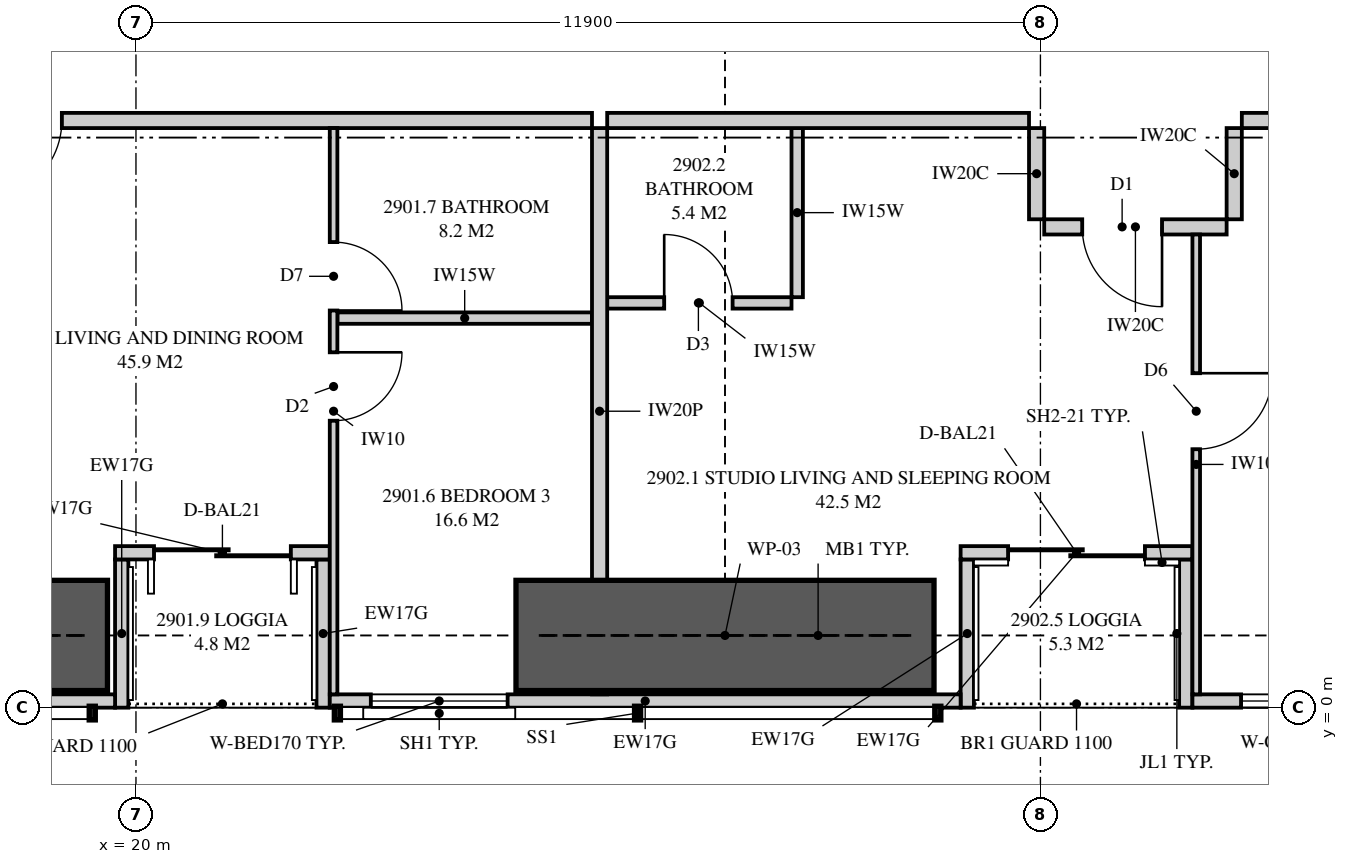
"""IFC4 building model, lengths in metres.
Left out: names, types, materials, properties, quantities, classifications, styles, units other than length and angle.
Written with IfcOpenShell. Run it as: python <this file> out.ifc"""

import sys

from ifc_helpers import new_model, si_unit, direction, frame, frame_2d, origin, place, context, subcontext, project, spatial, polyline, rectangle, outline, extrude, element, fill, save


model = new_model("IFC4")
c1 = context("Model", 3, precision=1e-05, world=origin(), true_north=direction((0.0, 1.0)))
c2 = subcontext(c1, "Body", "Model", "MODEL_VIEW")
j1 = project(units=[si_unit("LENGTHUNIT", "METRE"), si_unit("PLANEANGLEUNIT", "RADIAN")], contexts=[c1])
p1 = place(None, origin())
s1 = spatial("IfcSite", under=j1, at=p1, CompositionType="ELEMENT")
p2 = place(p1, origin())
s2 = spatial("IfcBuilding", under=s1, at=p2, CompositionType="ELEMENT")
p3 = place(p2, frame((0.0, 0.0, 108.2)))
s3 = spatial("IfcBuildingStorey", under=s2, at=p3, CompositionType="ELEMENT", Elevation=108.2)
p4 = place(p3, frame((9.051, 0.087, 0.0), z_axis=(0.0, 0.0, 1.0), x_axis=(1.0, 0.0, 0.0)))
e1 = element("IfcWall", 1, at=p4, inside=s3, PredefinedType="SOLIDWALL", context=c2, shape_type="SweptSolid", body=[
    extrude(outline(polyline([(0.0, 0.0), (10.674, 0.0), (10.674, 2.15), (7.824, 2.15), (7.824, 3.11), (7.666, 3.11), (7.666, 2.15), (7.62, 2.15), (7.62, 3.11), (0.0, 3.11), (0.0, 0.0)])), frame((0.0, 0.087, 0.0), z_axis=(0.0, -1.0, 0.0), x_axis=(1.0, 0.0, 0.0)), (0.0, 0.0, 1.0), 0.175),
])
p5 = place(p4, frame((2.349, 0.0, 0.4)))
e2 = element("IfcOpeningElement", 2, at=p5, cuts=e1, PredefinedType="OPENING", context=c2, shape_type="SweptSolid", body=[
    extrude(rectangle(XDim=1.8, YDim=1.7, at=frame_2d((0.9, 0.85))), frame((0.0, 0.097, 0.0), z_axis=(0.0, -1.0, 0.0), x_axis=(1.0, 0.0, 0.0)), (0.0, 0.0, 1.0), 0.195),
])
p6 = place(p3, frame((22.55, 0.087, 0.0), z_axis=(0.0, 0.0, 1.0), x_axis=(1.0, 0.0, 0.0)))
e3 = element("IfcWall", 3, at=p6, inside=s3, PredefinedType="SOLIDWALL", context=c2, shape_type="SweptSolid", body=[
    extrude(rectangle(XDim=8.3, YDim=0.175, at=frame_2d((4.15, 0.0))), origin(), (0.0, 0.0, 1.0), 2.15),
])
p7 = place(p6, frame((0.54, 0.0, 0.4)))
e4 = element("IfcOpeningElement", 4, at=p7, cuts=e3, PredefinedType="OPENING", context=c2, shape_type="SweptSolid", body=[
    extrude(rectangle(XDim=1.8, YDim=1.7, at=frame_2d((0.9, 0.85))), frame((0.0, 0.097, 0.0), z_axis=(0.0, -1.0, 0.0), x_axis=(1.0, 0.0, 0.0)), (0.0, 0.0, 1.0), 0.195),
])
p8 = place(p3, frame((33.9, 0.087, 0.0), z_axis=(0.0, 0.0, 1.0), x_axis=(1.0, 0.0, 0.0)))
e5 = element("IfcWall", 5, at=p8, inside=s3, PredefinedType="SOLIDWALL", context=c2, shape_type="SweptSolid", body=[
    extrude(outline(polyline([(0.0, 0.0), (7.75, 0.0), (7.75, 3.11), (4.928, 3.11), (4.928, 2.15), (4.883, 2.15), (4.883, 3.11), (4.725, 3.11), (4.725, 2.15), (0.0, 2.15), (0.0, 0.0)])), frame((0.0, 0.087, 0.0), z_axis=(0.0, -1.0, 0.0), x_axis=(1.0, 0.0, 0.0)), (0.0, 0.0, 1.0), 0.175),
])
p9 = place(p8, frame((0.64, 0.0, 0.4)))
e6 = element("IfcOpeningElement", 6, at=p9, cuts=e5, PredefinedType="OPENING", context=c2, shape_type="SweptSolid", body=[
    extrude(rectangle(XDim=1.2, YDim=1.7, at=frame_2d((0.6, 0.85))), frame((0.0, 0.097, 0.0), z_axis=(0.0, -1.0, 0.0), x_axis=(1.0, 0.0, 0.0)), (0.0, 0.0, 1.0), 0.195),
])
p10 = place(p3, frame((19.725, 2.038, 0.0), z_axis=(0.0, 0.0, 1.0), x_axis=(1.0, 0.0, 0.0)))
e7 = element("IfcWall", 7, at=p10, inside=s3, PredefinedType="SOLIDWALL", context=c2, shape_type="SweptSolid", body=[
    extrude(rectangle(XDim=2.825, YDim=0.175, at=frame_2d((1.413, 0.0))), origin(), (0.0, 0.0, 1.0), 3.11),
])
p11 = place(p10, frame((0.512, 0.0, 0.0)))
e8 = element("IfcOpeningElement", 8, at=p11, cuts=e7, PredefinedType="OPENING", context=c2, shape_type="SweptSolid", body=[
    extrude(rectangle(XDim=1.8, YDim=2.1, at=frame_2d((0.9, 1.05))), frame((0.0, 0.097, 0.0), z_axis=(0.0, -1.0, 0.0), x_axis=(1.0, 0.0, 0.0)), (0.0, 0.0, 1.0), 0.195),
])
for number, where, z_axis, x_axis in (
    (9, (19.812, 0.0, 0.0), (0.0, 0.0, 1.0), (0.0, 1.0, 0.0)),
    (10, (22.462, 0.0, 0.0), (0.0, 0.0, 1.0), (0.0, 1.0, 0.0)),
):
    element("IfcWall", number, at=place(p3, frame(where, z_axis=z_axis, x_axis=x_axis)), inside=s3, PredefinedType="SOLIDWALL", context=c2, shape_type="SweptSolid", body=[
        extrude(outline(polyline([(0.0, 0.0), (1.95, 0.0), (1.95, 3.11), (1.75, 3.11), (1.75, 2.15), (0.15, 2.15), (0.15, 3.11), (0.0, 3.11), (0.0, 0.0)])), frame((0.0, 0.087, 0.0), z_axis=(0.0, -1.0, 0.0), x_axis=(1.0, 0.0, 0.0)), (0.0, 0.0, 1.0), 0.175),
    ])
p12 = place(p3, frame((30.85, 2.038, 0.0), z_axis=(0.0, 0.0, 1.0), x_axis=(1.0, 0.0, 0.0)))
e11 = element("IfcWall", 11, at=p12, inside=s3, PredefinedType="SOLIDWALL", context=c2, shape_type="SweptSolid", body=[
    extrude(rectangle(XDim=3.05, YDim=0.175, at=frame_2d((1.525, 0.0))), origin(), (0.0, 0.0, 1.0), 3.11),
])
p13 = place(p12, frame((0.625, 0.0, 0.0)))
e12 = element("IfcOpeningElement", 12, at=p13, cuts=e11, PredefinedType="OPENING", context=c2, shape_type="SweptSolid", body=[
    extrude(rectangle(XDim=1.8, YDim=2.1, at=frame_2d((0.9, 1.05))), frame((0.0, 0.097, 0.0), z_axis=(0.0, -1.0, 0.0), x_axis=(1.0, 0.0, 0.0)), (0.0, 0.0, 1.0), 0.195),
])
for number, where, z_axis, x_axis in (
    (13, (30.938, 0.0, 0.0), (0.0, 0.0, 1.0), (0.0, 1.0, 0.0)),
    (14, (33.812, 0.0, 0.0), (0.0, 0.0, 1.0), (0.0, 1.0, 0.0)),
):
    element("IfcWall", number, at=place(p3, frame(where, z_axis=z_axis, x_axis=x_axis)), inside=s3, PredefinedType="SOLIDWALL", context=c2, shape_type="SweptSolid", body=[
        extrude(outline(polyline([(0.0, 0.0), (1.95, 0.0), (1.95, 3.11), (1.75, 3.11), (1.75, 2.15), (0.15, 2.15), (0.15, 3.11), (0.0, 3.11), (0.0, 0.0)])), frame((0.0, 0.087, 0.0), z_axis=(0.0, -1.0, 0.0), x_axis=(1.0, 0.0, 0.0)), (0.0, 0.0, 1.0), 0.175),
    ])
p14 = place(p3, frame((26.1, 0.175, 0.0), z_axis=(0.0, 0.0, 1.0), x_axis=(0.0, 1.0, 0.0)))
e15 = element("IfcWall", 15, at=p14, inside=s3, PredefinedType="PARTITIONING", context=c2, shape_type="SweptSolid", body=[
    extrude(outline(polyline([(0.529, 2.15), (0.0, 2.15), (0.0, 0.0), (0.529, 0.0), (0.529, 0.376), (1.021, 0.376), (1.021, 0.0), (7.45, 0.0), (7.45, 3.11), (1.685, 3.11), (1.685, 2.15), (1.021, 2.15), (1.021, 1.774), (0.529, 1.774), (0.529, 2.15)])), frame((0.0, 0.1, 0.0), z_axis=(0.0, -1.0, 0.0), x_axis=(1.0, 0.0, 0.0)), (0.0, 0.0, 1.0), 0.2),
])
p15 = place(p3, frame((17.775, 7.725, 0.0), z_axis=(0.0, 0.0, 1.0), x_axis=(1.0, 0.0, 0.0)))
e16 = element("IfcWall", 16, at=p15, inside=s3, PredefinedType="PARTITIONING", context=c2, shape_type="SweptSolid", body=[
    extrude(rectangle(XDim=8.225, YDim=0.2, at=frame_2d((4.113, 0.0))), origin(), (0.0, 0.0, 1.0), 3.11),
])
p16 = place(p15, frame((0.2, 0.0, 0.0)))
e17 = element("IfcOpeningElement", 17, at=p16, cuts=e16, PredefinedType="OPENING", context=c2, shape_type="SweptSolid", body=[
    extrude(rectangle(XDim=1.05, YDim=2.2, at=frame_2d((0.525, 1.1))), frame((0.0, 0.11, 0.0), z_axis=(0.0, -1.0, 0.0), x_axis=(1.0, 0.0, 0.0)), (0.0, 0.0, 1.0), 0.22),
])
p17 = place(p3, frame((22.6, 0.175, 0.0), z_axis=(0.0, 0.0, 1.0), x_axis=(0.0, 1.0, 0.0)))
e18 = element("IfcWall", 18, at=p17, inside=s3, PredefinedType="PARTITIONING", context=c2, shape_type="SweptSolid", body=[
    extrude(outline(polyline([(0.0, 0.0), (7.45, 0.0), (7.45, 3.11), (1.635, 3.11), (1.635, 2.15), (0.0, 2.15), (0.0, 3.11), (0.0, 0.0)])), frame((0.0, 0.05, 0.0), z_axis=(0.0, -1.0, 0.0), x_axis=(1.0, 0.0, 0.0)), (0.0, 0.0, 1.0), 0.1),
])
p18 = place(p17, frame((3.6, 0.0, 0.0)))
e19 = element("IfcOpeningElement", 19, at=p18, cuts=e18, PredefinedType="OPENING", context=c2, shape_type="SweptSolid", body=[
    extrude(rectangle(XDim=0.9, YDim=2.1, at=frame_2d((0.45, 1.05))), frame((0.0, 0.06, 0.0), z_axis=(0.0, -1.0, 0.0), x_axis=(1.0, 0.0, 0.0)), (0.0, 0.0, 1.0), 0.12),
])
p19 = place(p17, frame((5.05, 0.0, 0.0)))
e20 = element("IfcOpeningElement", 20, at=p19, cuts=e18, PredefinedType="OPENING", context=c2, shape_type="SweptSolid", body=[
    extrude(rectangle(XDim=0.9, YDim=2.1, at=frame_2d((0.45, 1.05))), frame((0.0, 0.06, 0.0), z_axis=(0.0, -1.0, 0.0), x_axis=(1.0, 0.0, 0.0)), (0.0, 0.0, 1.0), 0.12),
])
p20 = place(p3, frame((22.65, 5.125, 0.0), z_axis=(0.0, 0.0, 1.0), x_axis=(1.0, 0.0, 0.0)))
e21 = element("IfcWall", 21, at=p20, inside=s3, PredefinedType="PLUMBINGWALL", context=c2, shape_type="SweptSolid", body=[
    extrude(rectangle(XDim=3.35, YDim=0.15, at=frame_2d((1.675, 0.0))), origin(), (0.0, 0.0, 1.0), 3.11),
])
p21 = place(p3, frame((26.2, 7.725, 0.0), z_axis=(0.0, 0.0, 1.0), x_axis=(1.0, 0.0, 0.0)))
e22 = element("IfcWall", 22, at=p21, inside=s3, PredefinedType="PARTITIONING", context=c2, shape_type="SweptSolid", body=[
    extrude(outline(polyline([(0.0, 0.0), (5.55, 0.0), (5.55, 3.11), (1.887, 3.11), (1.887, 2.541), (1.213, 2.541), (1.213, 3.11), (0.0, 3.11), (0.0, 0.0)])), frame((0.0, 0.1, 0.0), z_axis=(0.0, -1.0, 0.0), x_axis=(1.0, 0.0, 0.0)), (0.0, 0.0, 1.0), 0.2),
])
p22 = place(p3, frame((26.2, 5.325, 0.0), z_axis=(0.0, 0.0, 1.0), x_axis=(1.0, 0.0, 0.0)))
e23 = element("IfcWall", 23, at=p22, inside=s3, PredefinedType="PLUMBINGWALL", context=c2, shape_type="SweptSolid", body=[
    extrude(outline(polyline([(0.0, 0.0), (2.425, 0.0), (2.425, 3.11), (1.862, 3.11), (1.862, 2.541), (1.238, 2.541), (1.238, 3.11), (0.0, 3.11), (0.0, 0.0)])), frame((0.0, 0.075, 0.0), z_axis=(0.0, -1.0, 0.0), x_axis=(1.0, 0.0, 0.0)), (0.0, 0.0, 1.0), 0.15),
])
p23 = place(p22, frame((0.75, 0.0, 0.0)))
e24 = element("IfcOpeningElement", 24, at=p23, cuts=e23, PredefinedType="OPENING", context=c2, shape_type="SweptSolid", body=[
    extrude(rectangle(XDim=0.9, YDim=2.1, at=frame_2d((0.45, 1.05))), frame((0.0, 0.085, 0.0), z_axis=(0.0, -1.0, 0.0), x_axis=(1.0, 0.0, 0.0)), (0.0, 0.0, 1.0), 0.17),
])
p24 = place(p3, frame((28.7, 5.4, 0.0), z_axis=(0.0, 0.0, 1.0), x_axis=(0.0, 1.0, 0.0)))
e25 = element("IfcWall", 25, at=p24, inside=s3, PredefinedType="PLUMBINGWALL", context=c2, shape_type="SweptSolid", body=[
    extrude(rectangle(XDim=2.225, YDim=0.15, at=frame_2d((1.113, 0.0))), origin(), (0.0, 0.0, 1.0), 3.11),
])
p25 = place(p3, frame((33.95, 0.175, 0.0), z_axis=(0.0, 0.0, 1.0), x_axis=(0.0, 1.0, 0.0)))
e26 = element("IfcWall", 26, at=p25, inside=s3, PredefinedType="PARTITIONING", context=c2, shape_type="SweptSolid", body=[
    extrude(outline(polyline([(0.0, 0.0), (6.05, 0.0), (6.05, 3.11), (1.635, 3.11), (1.635, 2.15), (0.0, 2.15), (0.0, 3.11), (0.0, 0.0)])), frame((0.0, 0.05, 0.0), z_axis=(0.0, -1.0, 0.0), x_axis=(1.0, 0.0, 0.0)), (0.0, 0.0, 1.0), 0.1),
])
p26 = place(p25, frame((3.225, 0.0, 0.0)))
e27 = element("IfcOpeningElement", 27, at=p26, cuts=e26, PredefinedType="OPENING", context=c2, shape_type="SweptSolid", body=[
    extrude(rectangle(XDim=1.0, YDim=2.1, at=frame_2d((0.5, 1.05))), frame((0.0, 0.06, 0.0), z_axis=(0.0, -1.0, 0.0), x_axis=(1.0, 0.0, 0.0)), (0.0, 0.0, 1.0), 0.12),
])
p27 = place(p3, frame((34.55, 7.725, 0.0), z_axis=(0.0, 0.0, 1.0), x_axis=(1.0, 0.0, 0.0)))
e28 = element("IfcWall", 28, at=p27, inside=s3, PredefinedType="PARTITIONING", context=c2, shape_type="SweptSolid", body=[
    extrude(outline(polyline([(0.0, 0.0), (5.15, 0.0), (5.15, 3.11), (4.412, 3.11), (4.412, 2.541), (3.738, 2.541), (3.738, 3.11), (0.0, 3.11), (0.0, 0.0)])), frame((0.0, 0.1, 0.0), z_axis=(0.0, -1.0, 0.0), x_axis=(1.0, 0.0, 0.0)), (0.0, 0.0, 1.0), 0.2),
])
p28 = place(p3, frame((31.95, 6.325, 0.0), z_axis=(0.0, 0.0, 1.0), x_axis=(1.0, 0.0, 0.0)))
e29 = element("IfcWall", 29, at=p28, inside=s3, PredefinedType="PARTITIONING", context=c2, shape_type="SweptSolid", body=[
    extrude(rectangle(XDim=2.4, YDim=0.2, at=frame_2d((1.2, 0.0))), origin(), (0.0, 0.0, 1.0), 3.11),
])
p29 = place(p28, frame((0.5, 0.0, 0.0)))
e30 = element("IfcOpeningElement", 30, at=p29, cuts=e29, PredefinedType="OPENING", context=c2, shape_type="SweptSolid", body=[
    extrude(rectangle(XDim=1.05, YDim=2.2, at=frame_2d((0.525, 1.1))), frame((0.0, 0.11, 0.0), z_axis=(0.0, -1.0, 0.0), x_axis=(1.0, 0.0, 0.0)), (0.0, 0.0, 1.0), 0.22),
])
for number, where, z_axis, x_axis in (
    (31, (31.85, 7.625, 0.0), (0.0, 0.0, 1.0), (0.0, -1.0, 0.0)),
    (32, (34.45, 7.625, 0.0), (0.0, 0.0, 1.0), (0.0, -1.0, 0.0)),
):
    element("IfcWall", number, at=place(p3, frame(where, z_axis=z_axis, x_axis=x_axis)), inside=s3, PredefinedType="PARTITIONING", context=c2, shape_type="SweptSolid", body=[
        extrude(rectangle(XDim=1.2, YDim=0.2, at=frame_2d((0.6, 0.0))), origin(), (0.0, 0.0, 1.0), 3.11),
    ])
for number, where, z_axis, x_axis in (
    (33, (14.125, 0.95, 0.0), (0.0, 0.0, 1.0), (1.0, 0.0, 0.0)),
    (34, (25.0, 0.95, 0.0), (0.0, 0.0, 1.0), (1.0, 0.0, 0.0)),
):
    element("IfcWall", number, at=place(p3, frame(where, z_axis=z_axis, x_axis=x_axis)), inside=s3, PredefinedType="SHEAR", context=c2, shape_type="SweptSolid", body=[
        extrude(rectangle(XDim=5.5, YDim=1.45, at=frame_2d((2.75, 0.0))), origin(), (0.0, 0.0, 1.0), 3.35),
    ])
p30 = place(p11, origin())
e35 = element("IfcDoor", 35, at=p30, inside=s3, OperationType="SLIDING_TO_LEFT", PredefinedType="DOOR", context=c2, shape_type="SweptSolid", body=[
    extrude(rectangle(XDim=1.8, YDim=2.1, at=frame_2d((0.9, 1.05))), frame((0.0, 0.025, 0.0), z_axis=(0.0, -1.0, 0.0), x_axis=(1.0, 0.0, 0.0)), (0.0, 0.0, 1.0), 0.05),
])
fill(e8, e35)
p31 = place(p7, origin())
e36 = element("IfcWindow", 36, at=p31, inside=s3, PartitioningType="SINGLE_PANEL", PredefinedType="WINDOW", context=c2, shape_type="SweptSolid", body=[
    extrude(rectangle(XDim=1.8, YDim=1.7, at=frame_2d((0.9, 0.85))), frame((0.0, 0.03, 0.0), z_axis=(0.0, -1.0, 0.0), x_axis=(1.0, 0.0, 0.0)), (0.0, 0.0, 1.0), 0.06),
])
fill(e4, e36)
p32 = place(p13, origin())
e37 = element("IfcDoor", 37, at=p32, inside=s3, OperationType="SLIDING_TO_LEFT", PredefinedType="DOOR", context=c2, shape_type="SweptSolid", body=[
    extrude(rectangle(XDim=1.8, YDim=2.1, at=frame_2d((0.9, 1.05))), frame((0.0, 0.025, 0.0), z_axis=(0.0, -1.0, 0.0), x_axis=(1.0, 0.0, 0.0)), (0.0, 0.0, 1.0), 0.05),
])
fill(e12, e37)
p33 = place(p9, origin())
e38 = element("IfcWindow", 38, at=p33, inside=s3, PartitioningType="SINGLE_PANEL", PredefinedType="WINDOW", context=c2, shape_type="SweptSolid", body=[
    extrude(rectangle(XDim=1.2, YDim=1.7, at=frame_2d((0.6, 0.85))), frame((0.0, 0.03, 0.0), z_axis=(0.0, -1.0, 0.0), x_axis=(1.0, 0.0, 0.0)), (0.0, 0.0, 1.0), 0.06),
])
fill(e6, e38)
p34 = place(p16, frame((1.05, 0.0, 0.0), z_axis=(0.0, 0.0, 1.0), x_axis=(-1.0, 0.0, 0.0)))
e39 = element("IfcDoor", 39, at=p34, inside=s3, OperationType="SINGLE_SWING_RIGHT", PredefinedType="DOOR", context=c2, shape_type="SweptSolid", body=[
    extrude(rectangle(XDim=1.05, YDim=2.2, at=frame_2d((0.525, 1.1))), frame((0.0, 0.025, 0.0), z_axis=(0.0, -1.0, 0.0), x_axis=(1.0, 0.0, 0.0)), (0.0, 0.0, 1.0), 0.05),
])
fill(e17, e39)
p35 = place(p18, frame((0.9, 0.0, 0.0), z_axis=(0.0, 0.0, 1.0), x_axis=(-1.0, 0.0, 0.0)))
e40 = element("IfcDoor", 40, at=p35, inside=s3, OperationType="SINGLE_SWING_LEFT", PredefinedType="DOOR", context=c2, shape_type="SweptSolid", body=[
    extrude(rectangle(XDim=0.9, YDim=2.1, at=frame_2d((0.45, 1.05))), frame((0.0, 0.025, 0.0), z_axis=(0.0, -1.0, 0.0), x_axis=(1.0, 0.0, 0.0)), (0.0, 0.0, 1.0), 0.05),
])
fill(e19, e40)
p36 = place(p19, frame((0.9, 0.0, 0.0), z_axis=(0.0, 0.0, 1.0), x_axis=(-1.0, 0.0, 0.0)))
e41 = element("IfcDoor", 41, at=p36, inside=s3, OperationType="SINGLE_SWING_RIGHT", PredefinedType="DOOR", context=c2, shape_type="SweptSolid", body=[
    extrude(rectangle(XDim=0.9, YDim=2.1, at=frame_2d((0.45, 1.05))), frame((0.0, 0.025, 0.0), z_axis=(0.0, -1.0, 0.0), x_axis=(1.0, 0.0, 0.0)), (0.0, 0.0, 1.0), 0.05),
])
fill(e20, e41)
p37 = place(p29, frame((1.05, 0.0, 0.0), z_axis=(0.0, 0.0, 1.0), x_axis=(-1.0, 0.0, 0.0)))
e42 = element("IfcDoor", 42, at=p37, inside=s3, OperationType="SINGLE_SWING_LEFT", PredefinedType="DOOR", context=c2, shape_type="SweptSolid", body=[
    extrude(rectangle(XDim=1.05, YDim=2.2, at=frame_2d((0.525, 1.1))), frame((0.0, 0.025, 0.0), z_axis=(0.0, -1.0, 0.0), x_axis=(1.0, 0.0, 0.0)), (0.0, 0.0, 1.0), 0.05),
])
fill(e30, e42)
p38 = place(p23, origin())
e43 = element("IfcDoor", 43, at=p38, inside=s3, OperationType="SINGLE_SWING_LEFT", PredefinedType="DOOR", context=c2, shape_type="SweptSolid", body=[
    extrude(rectangle(XDim=0.9, YDim=2.1, at=frame_2d((0.45, 1.05))), frame((0.0, 0.025, 0.0), z_axis=(0.0, -1.0, 0.0), x_axis=(1.0, 0.0, 0.0)), (0.0, 0.0, 1.0), 0.05),
])
fill(e24, e43)
p39 = place(p26, frame((1.0, 0.0, 0.0), z_axis=(0.0, 0.0, 1.0), x_axis=(-1.0, 0.0, 0.0)))
e44 = element("IfcDoor", 44, at=p39, inside=s3, OperationType="SINGLE_SWING_LEFT", PredefinedType="DOOR", context=c2, shape_type="SweptSolid", body=[
    extrude(rectangle(XDim=1.0, YDim=2.1, at=frame_2d((0.5, 1.05))), frame((0.0, 0.025, 0.0), z_axis=(0.0, -1.0, 0.0), x_axis=(1.0, 0.0, 0.0)), (0.0, 0.0, 1.0), 0.05),
])
fill(e27, e44)
save(model, sys.argv[1])
